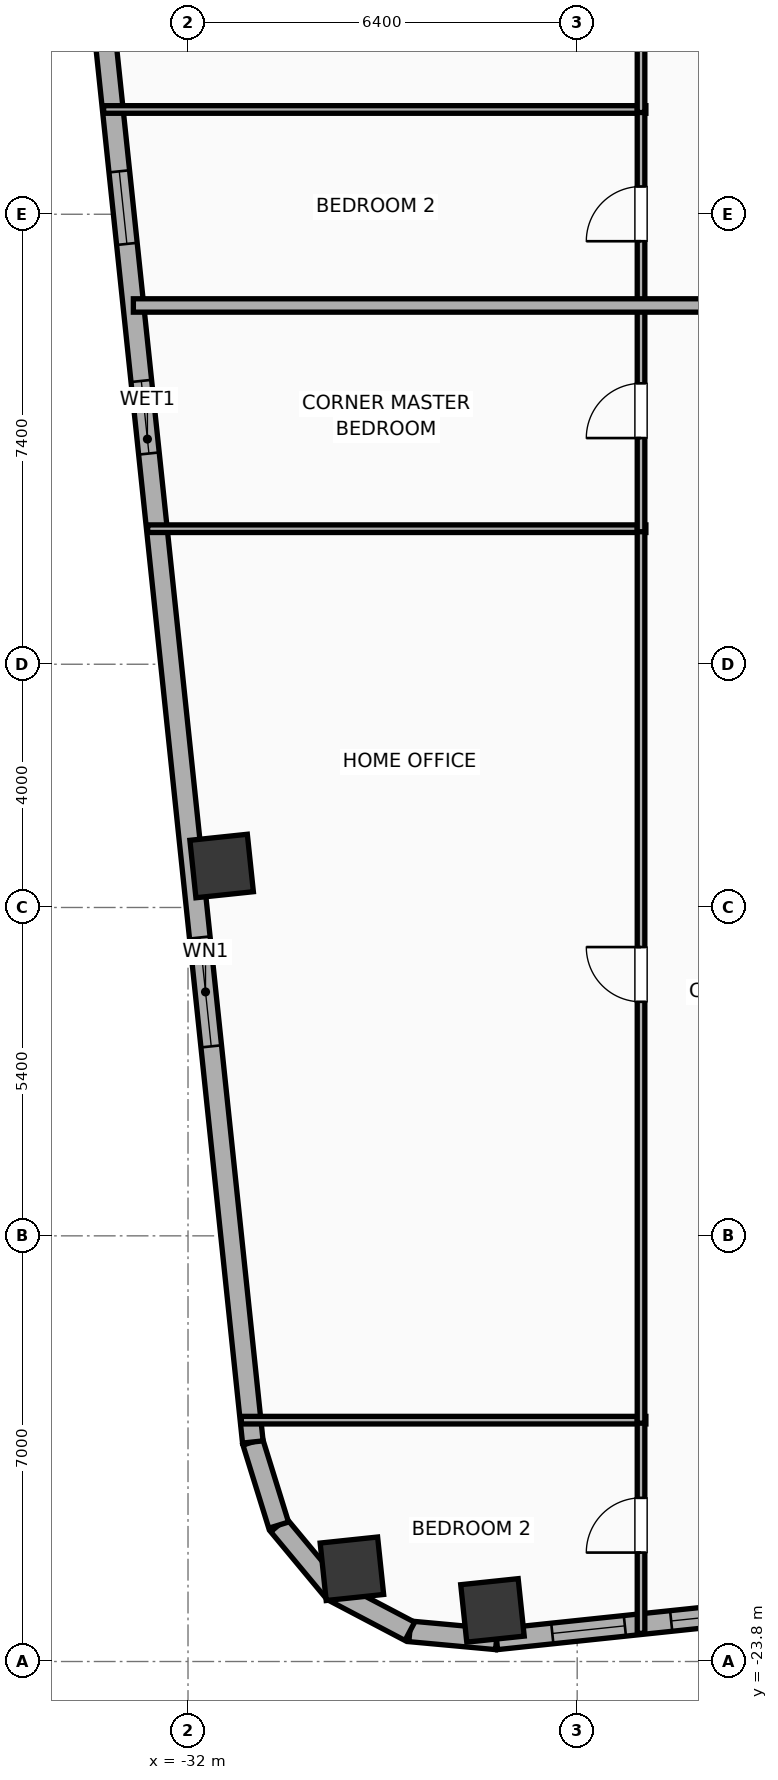
"""IFC4 building model, lengths in metres.
Left out: names, types, materials, properties, quantities, classifications, styles, units other than length and angle.
Written with IfcOpenShell. Run it as: python <this file> out.ifc"""

import sys

from ifc_helpers import new_model, si_unit, direction, frame, frame_2d, origin, origin_2d, place, context, subcontext, project, spatial, rectangle, hollow_rectangle, hollow_circle, extrude, element, fill, save


model = new_model("IFC4")
c1 = context("Model", 3, precision=1e-05, world=origin(), true_north=direction((0.0, 1.0)))
c2 = subcontext(c1, "Body", "Model", "MODEL_VIEW")
j1 = project(units=[si_unit("LENGTHUNIT", "METRE"), si_unit("PLANEANGLEUNIT", "RADIAN")], contexts=[c1])
p1 = place(None, origin())
s1 = spatial("IfcSite", under=j1, at=p1, CompositionType="ELEMENT")
p2 = place(p1, origin())
s2 = spatial("IfcBuilding", under=s1, at=p2, CompositionType="ELEMENT")
p3 = place(p2, frame((0.0, 0.0, 156.0)))
s3 = spatial("IfcBuildingStorey", under=s2, at=p3, CompositionType="ELEMENT", Elevation=156.0)
for number, where, z_axis, x_axis in (
    (1, (-26.993, -22.959, 0.0), (0.0, 0.0, 1.0), (0.995, 0.105, 0.0)),
    (2, (-31.447, -10.718, 0.0), (0.0, 0.0, 1.0), (0.995, 0.105, 0.0)),
):
    element("IfcColumn", number, at=place(p3, frame(where, z_axis=z_axis, x_axis=x_axis)), inside=s3, PredefinedType="COLUMN", context=c2, shape_type="SweptSolid", body=[
        extrude(hollow_rectangle(XDim=0.95, YDim=0.95, WallThickness=0.032, at=origin_2d()), origin(), (0.0, 0.0, 1.0), 3.9),
    ])
p4 = place(p3, frame((-29.305, -22.275, 0.0), z_axis=(0.0, 0.0, 1.0), x_axis=(0.994521895368, 0.104528463268, 0.0)))
e3 = element("IfcColumn", 3, at=p4, inside=s3, PredefinedType="COLUMN", context=c2, shape_type="SweptSolid", body=[
    extrude(hollow_circle(Radius=0.475, WallThickness=0.032, at=origin_2d()), origin(), (0.0, 0.0, 1.0), 3.9),
])
p5 = place(p3, frame((24.756, -18.003, 0.0), z_axis=(0.0, 0.0, 1.0), x_axis=(-0.99452160744, -0.104531202687, 0.0)))
e4 = element("IfcWall", 4, at=p5, inside=s3, PredefinedType="ELEMENTEDWALL", context=c2, shape_type="SweptSolid", body=[
    extrude(rectangle(XDim=51.967, YDim=0.34, at=frame_2d((25.983, 0.0))), origin(), (0.0, 0.0, 1.0), 3.65),
])
p6 = place(p5, frame((25.633, 0.0, 0.75)))
e5 = element("IfcOpeningElement", 5, at=p6, cuts=e4, PredefinedType="OPENING", context=c2, shape_type="SweptSolid", body=[
    extrude(rectangle(XDim=2.4, YDim=2.1, at=frame_2d((1.2, 1.05))), frame((0.0, 0.18, 0.0), z_axis=(0.0, -1.0, 0.0), x_axis=(1.0, 0.0, 0.0)), (0.0, 0.0, 1.0), 0.36),
])
p7 = place(p5, frame((42.369, 0.0, 0.75)))
e6 = element("IfcOpeningElement", 6, at=p7, cuts=e4, PredefinedType="OPENING", context=c2, shape_type="SweptSolid", body=[
    extrude(rectangle(XDim=1.2, YDim=2.05, at=frame_2d((0.6, 1.025))), frame((0.0, 0.18, 0.0), z_axis=(0.0, -1.0, 0.0), x_axis=(1.0, 0.0, 0.0)), (0.0, 0.0, 1.0), 0.36),
])
p8 = place(p5, frame((34.085, 0.0, 0.75)))
e7 = element("IfcOpeningElement", 7, at=p8, cuts=e4, PredefinedType="OPENING", context=c2, shape_type="SweptSolid", body=[
    extrude(rectangle(XDim=1.2, YDim=2.05, at=frame_2d((0.6, 1.025))), frame((0.0, 0.18, 0.0), z_axis=(0.0, -1.0, 0.0), x_axis=(1.0, 0.0, 0.0)), (0.0, 0.0, 1.0), 0.36),
])
p9 = place(p5, frame((36.993, 0.0, 0.75)))
e8 = element("IfcOpeningElement", 8, at=p9, cuts=e4, PredefinedType="OPENING", context=c2, shape_type="SweptSolid", body=[
    extrude(rectangle(XDim=1.2, YDim=2.05, at=frame_2d((0.6, 1.025))), frame((0.0, 0.18, 0.0), z_axis=(0.0, -1.0, 0.0), x_axis=(1.0, 0.0, 0.0)), (0.0, 0.0, 1.0), 0.36),
])
p10 = place(p5, frame((14.397, 0.0, 0.75)))
e9 = element("IfcOpeningElement", 9, at=p10, cuts=e4, PredefinedType="OPENING", context=c2, shape_type="SweptSolid", body=[
    extrude(rectangle(XDim=1.2, YDim=2.05, at=frame_2d((0.6, 1.025))), frame((0.0, 0.18, 0.0), z_axis=(0.0, -1.0, 0.0), x_axis=(1.0, 0.0, 0.0)), (0.0, 0.0, 1.0), 0.36),
])
p11 = place(p5, frame((11.489, 0.0, 0.75)))
e10 = element("IfcOpeningElement", 10, at=p11, cuts=e4, PredefinedType="OPENING", context=c2, shape_type="SweptSolid", body=[
    extrude(rectangle(XDim=1.2, YDim=2.05, at=frame_2d((0.6, 1.025))), frame((0.0, 0.18, 0.0), z_axis=(0.0, -1.0, 0.0), x_axis=(1.0, 0.0, 0.0)), (0.0, 0.0, 1.0), 0.36),
])
p12 = place(p5, frame((8.521, 0.0, 0.75)))
e11 = element("IfcOpeningElement", 11, at=p12, cuts=e4, PredefinedType="OPENING", context=c2, shape_type="SweptSolid", body=[
    extrude(rectangle(XDim=1.2, YDim=2.05, at=frame_2d((0.6, 1.025))), frame((0.0, 0.18, 0.0), z_axis=(0.0, -1.0, 0.0), x_axis=(1.0, 0.0, 0.0)), (0.0, 0.0, 1.0), 0.36),
])
p13 = place(p5, frame((5.582, 0.0, 0.75)))
e12 = element("IfcOpeningElement", 12, at=p13, cuts=e4, PredefinedType="OPENING", context=c2, shape_type="SweptSolid", body=[
    extrude(rectangle(XDim=1.2, YDim=2.05, at=frame_2d((0.6, 1.025))), frame((0.0, 0.18, 0.0), z_axis=(0.0, -1.0, 0.0), x_axis=(1.0, 0.0, 0.0)), (0.0, 0.0, 1.0), 0.36),
])
p14 = place(p5, frame((29.313, 0.0, 0.75)))
e13 = element("IfcOpeningElement", 13, at=p14, cuts=e4, PredefinedType="OPENING", context=c2, shape_type="SweptSolid", body=[
    extrude(rectangle(XDim=1.2, YDim=2.05, at=frame_2d((0.6, 1.025))), frame((0.0, 0.18, 0.0), z_axis=(0.0, -1.0, 0.0), x_axis=(1.0, 0.0, 0.0)), (0.0, 0.0, 1.0), 0.36),
])
p15 = place(p5, frame((22.248, 0.0, 0.75)))
e14 = element("IfcOpeningElement", 14, at=p15, cuts=e4, PredefinedType="OPENING", context=c2, shape_type="SweptSolid", body=[
    extrude(rectangle(XDim=1.2, YDim=2.05, at=frame_2d((0.6, 1.025))), frame((0.0, 0.18, 0.0), z_axis=(0.0, -1.0, 0.0), x_axis=(1.0, 0.0, 0.0)), (0.0, 0.0, 1.0), 0.36),
])
p16 = place(p5, frame((18.186, 0.0, 0.75)))
e15 = element("IfcOpeningElement", 15, at=p16, cuts=e4, PredefinedType="OPENING", context=c2, shape_type="SweptSolid", body=[
    extrude(rectangle(XDim=1.2, YDim=2.05, at=frame_2d((0.6, 1.025))), frame((0.0, 0.18, 0.0), z_axis=(0.0, -1.0, 0.0), x_axis=(1.0, 0.0, 0.0)), (0.0, 0.0, 1.0), 0.36),
])
p17 = place(p5, frame((47.879, 0.0, 0.75)))
e16 = element("IfcOpeningElement", 16, at=p17, cuts=e4, PredefinedType="OPENING", context=c2, shape_type="SweptSolid", body=[
    extrude(rectangle(XDim=1.2, YDim=2.05, at=frame_2d((0.6, 1.025))), frame((0.0, 0.18, 0.0), z_axis=(0.0, -1.0, 0.0), x_axis=(1.0, 0.0, 0.0)), (0.0, 0.0, 1.0), 0.36),
])
p18 = place(p5, frame((49.844, 0.0, 0.75)))
e17 = element("IfcOpeningElement", 17, at=p18, cuts=e4, PredefinedType="OPENING", context=c2, shape_type="SweptSolid", body=[
    extrude(rectangle(XDim=1.2, YDim=2.05, at=frame_2d((0.6, 1.025))), frame((0.0, 0.18, 0.0), z_axis=(0.0, -1.0, 0.0), x_axis=(1.0, 0.0, 0.0)), (0.0, 0.0, 1.0), 0.36),
])
p19 = place(p3, frame((-26.926, -23.435, 0.0), z_axis=(0.0, 0.0, 1.0), x_axis=(-0.995800460351, 0.091550222087, 0.0)))
e18 = element("IfcWall", 18, at=p19, inside=s3, PredefinedType="ELEMENTEDWALL", context=c2, shape_type="SweptSolid", body=[
    extrude(rectangle(XDim=1.432, YDim=0.34, at=frame_2d((0.716, 0.0))), origin(), (0.0, 0.0, 1.0), 3.65),
])
p20 = place(p3, frame((-28.352, -23.304, 0.0), z_axis=(0.0, 0.0, 1.0), x_axis=(-0.884989312682, 0.465611336243, 0.0)))
e19 = element("IfcWall", 19, at=p20, inside=s3, PredefinedType="ELEMENTEDWALL", context=c2, shape_type="SweptSolid", body=[
    extrude(rectangle(XDim=1.415, YDim=0.34, at=frame_2d((0.708, 0.0))), origin(), (0.0, 0.0, 1.0), 3.65),
])
p21 = place(p3, frame((-29.605, -22.645, 0.0), z_axis=(0.0, 0.0, 1.0), x_axis=(-0.639437361921, 0.768843196093, 0.0)))
e20 = element("IfcWall", 20, at=p21, inside=s3, PredefinedType="ELEMENTEDWALL", context=c2, shape_type="SweptSolid", body=[
    extrude(rectangle(XDim=1.415, YDim=0.34, at=frame_2d((0.708, 0.0))), origin(), (0.0, 0.0, 1.0), 3.65),
])
p22 = place(p3, frame((-30.51, -21.557, 0.0), z_axis=(0.0, 0.0, 1.0), x_axis=(-0.296624409546, 0.9549942197, 0.0)))
e21 = element("IfcWall", 21, at=p22, inside=s3, PredefinedType="ELEMENTEDWALL", context=c2, shape_type="SweptSolid", body=[
    extrude(rectangle(XDim=1.432, YDim=0.34, at=frame_2d((0.716, 0.0))), origin(), (0.0, 0.0, 1.0), 3.65),
])
p23 = place(p3, frame((-30.934, -20.19, 0.0), z_axis=(0.0, 0.0, 1.0), x_axis=(-0.10452691388, 0.994522058214, 0.0)))
e22 = element("IfcWall", 22, at=p23, inside=s3, PredefinedType="ELEMENTEDWALL", context=c2, shape_type="SweptSolid", body=[
    extrude(rectangle(XDim=33.167, YDim=0.34, at=frame_2d((16.583, 0.0))), origin(), (0.0, 0.0, 1.0), 3.65),
])
p24 = place(p23, frame((6.542, 0.0, 0.75)))
e23 = element("IfcOpeningElement", 23, at=p24, cuts=e22, PredefinedType="OPENING", context=c2, shape_type="SweptSolid", body=[
    extrude(rectangle(XDim=1.8, YDim=2.1, at=frame_2d((0.9, 1.05))), frame((0.0, 0.18, 0.0), z_axis=(0.0, -1.0, 0.0), x_axis=(1.0, 0.0, 0.0)), (0.0, 0.0, 1.0), 0.36),
])
p25 = place(p23, frame((24.825, 0.0, 0.75)))
e24 = element("IfcOpeningElement", 24, at=p25, cuts=e22, PredefinedType="OPENING", context=c2, shape_type="SweptSolid", body=[
    extrude(rectangle(XDim=1.8, YDim=2.1, at=frame_2d((0.9, 1.05))), frame((0.0, 0.18, 0.0), z_axis=(0.0, -1.0, 0.0), x_axis=(1.0, 0.0, 0.0)), (0.0, 0.0, 1.0), 0.36),
])
p26 = place(p23, frame((16.344, 0.0, 0.75)))
e25 = element("IfcOpeningElement", 25, at=p26, cuts=e22, PredefinedType="OPENING", context=c2, shape_type="SweptSolid", body=[
    extrude(rectangle(XDim=1.2, YDim=2.05, at=frame_2d((0.6, 1.025))), frame((0.0, 0.18, 0.0), z_axis=(0.0, -1.0, 0.0), x_axis=(1.0, 0.0, 0.0)), (0.0, 0.0, 1.0), 0.36),
])
p27 = place(p23, frame((19.811, 0.0, 0.75)))
e26 = element("IfcOpeningElement", 26, at=p27, cuts=e22, PredefinedType="OPENING", context=c2, shape_type="SweptSolid", body=[
    extrude(rectangle(XDim=1.2, YDim=2.05, at=frame_2d((0.6, 1.025))), frame((0.0, 0.18, 0.0), z_axis=(0.0, -1.0, 0.0), x_axis=(1.0, 0.0, 0.0)), (0.0, 0.0, 1.0), 0.36),
])
p28 = place(p3, frame((-31.123, -19.831, 0.0), z_axis=(0.0, 0.0, 1.0), x_axis=(1.0, 0.0, 0.0)))
e27 = element("IfcWall", 27, at=p28, inside=s3, PredefinedType="PARTITIONING", context=c2, shape_type="SweptSolid", body=[
    extrude(rectangle(XDim=6.653, YDim=0.125, at=frame_2d((3.326, 0.0))), origin(), (0.0, 0.0, 1.0), 3.65),
])
p29 = place(p3, frame((-32.664, -5.171, 0.0), z_axis=(0.0, 0.0, 1.0), x_axis=(1.0, 0.0, 0.0)))
e28 = element("IfcWall", 28, at=p29, inside=s3, PredefinedType="PARTITIONING", context=c2, shape_type="SweptSolid", body=[
    extrude(rectangle(XDim=8.194, YDim=0.125, at=frame_2d((4.097, 0.0))), origin(), (0.0, 0.0, 1.0), 3.65),
])
p30 = place(p3, frame((-24.55, -23.336, 0.0), z_axis=(0.0, 0.0, 1.0), x_axis=(0.0, 1.0, 0.0)))
e29 = element("IfcWall", 29, at=p30, inside=s3, PredefinedType="PARTITIONING", context=c2, shape_type="SweptSolid", body=[
    extrude(rectangle(XDim=3.555, YDim=0.125, at=frame_2d((1.778, 0.0))), origin(), (0.0, 0.0, 1.0), 3.65),
])
p31 = place(p30, frame((1.328, 0.0, 0.0)))
e30 = element("IfcOpeningElement", 30, at=p31, cuts=e29, PredefinedType="OPENING", context=c2, shape_type="SweptSolid", body=[
    extrude(rectangle(XDim=0.9, YDim=2.05, at=frame_2d((0.45, 1.025))), frame((0.0, 0.073, 0.0), z_axis=(0.0, -1.0, 0.0), x_axis=(1.0, 0.0, 0.0)), (0.0, 0.0, 1.0), 0.145),
])
p32 = place(p3, frame((-24.55, -19.881, 0.0), z_axis=(0.0, 0.0, 1.0), x_axis=(0.0, 1.0, 0.0)))
e31 = element("IfcWall", 31, at=p32, inside=s3, PredefinedType="PARTITIONING", context=c2, shape_type="SweptSolid", body=[
    extrude(rectangle(XDim=14.76, YDim=0.125, at=frame_2d((7.38, 0.0))), origin(), (0.0, 0.0, 1.0), 3.65),
])
p33 = place(p32, frame((6.93, 0.0, 0.0)))
e32 = element("IfcOpeningElement", 32, at=p33, cuts=e31, PredefinedType="OPENING", context=c2, shape_type="SweptSolid", body=[
    extrude(rectangle(XDim=0.9, YDim=2.05, at=frame_2d((0.45, 1.025))), frame((0.0, 0.073, 0.0), z_axis=(0.0, -1.0, 0.0), x_axis=(1.0, 0.0, 0.0)), (0.0, 0.0, 1.0), 0.145),
])
p34 = place(p3, frame((-24.55, -5.221, 0.0), z_axis=(0.0, 0.0, 1.0), x_axis=(0.0, 1.0, 0.0)))
e33 = element("IfcWall", 33, at=p34, inside=s3, PredefinedType="PARTITIONING", context=c2, shape_type="SweptSolid", body=[
    extrude(rectangle(XDim=3.783, YDim=0.125, at=frame_2d((1.892, 0.0))), origin(), (0.0, 0.0, 1.0), 3.65),
])
p35 = place(p34, frame((1.541, 0.0, 0.0)))
e34 = element("IfcOpeningElement", 34, at=p35, cuts=e33, PredefinedType="OPENING", context=c2, shape_type="SweptSolid", body=[
    extrude(rectangle(XDim=0.9, YDim=2.05, at=frame_2d((0.45, 1.025))), frame((0.0, 0.073, 0.0), z_axis=(0.0, -1.0, 0.0), x_axis=(1.0, 0.0, 0.0)), (0.0, 0.0, 1.0), 0.145),
])
p36 = place(p3, frame((-33.388, 1.723, 0.0), z_axis=(0.0, 0.0, 1.0), x_axis=(1.0, 0.0, 0.0)))
e35 = element("IfcWall", 35, at=p36, inside=s3, PredefinedType="PARTITIONING", context=c2, shape_type="SweptSolid", body=[
    extrude(rectangle(XDim=8.918, YDim=0.125, at=frame_2d((4.459, 0.0))), origin(), (0.0, 0.0, 1.0), 3.65),
])
p37 = place(p3, frame((-24.55, -1.562, 0.0), z_axis=(0.0, 0.0, 1.0), x_axis=(0.0, 1.0, 0.0)))
e36 = element("IfcWall", 36, at=p37, inside=s3, PredefinedType="PARTITIONING", context=c2, shape_type="SweptSolid", body=[
    extrude(rectangle(XDim=3.335, YDim=0.125, at=frame_2d((1.668, 0.0))), origin(), (0.0, 0.0, 1.0), 3.65),
])
p38 = place(p37, frame((1.119, 0.0, 0.0)))
e37 = element("IfcOpeningElement", 37, at=p38, cuts=e36, PredefinedType="OPENING", context=c2, shape_type="SweptSolid", body=[
    extrude(rectangle(XDim=0.9, YDim=2.05, at=frame_2d((0.45, 1.025))), frame((0.0, 0.073, 0.0), z_axis=(0.0, -1.0, 0.0), x_axis=(1.0, 0.0, 0.0)), (0.0, 0.0, 1.0), 0.145),
])
p39 = place(p3, frame((-24.55, 1.673, 0.0), z_axis=(0.0, 0.0, 1.0), x_axis=(0.0, 1.0, 0.0)))
e38 = element("IfcWall", 38, at=p39, inside=s3, PredefinedType="PARTITIONING", context=c2, shape_type="SweptSolid", body=[
    extrude(rectangle(XDim=12.942, YDim=0.125, at=frame_2d((6.471, 0.0))), origin(), (0.0, 0.0, 1.0), 3.65),
])
p40 = place(p39, frame((6.021, 0.0, 0.0)))
e39 = element("IfcOpeningElement", 39, at=p40, cuts=e38, PredefinedType="OPENING", context=c2, shape_type="SweptSolid", body=[
    extrude(rectangle(XDim=0.9, YDim=2.05, at=frame_2d((0.45, 1.025))), frame((0.0, 0.073, 0.0), z_axis=(0.0, -1.0, 0.0), x_axis=(1.0, 0.0, 0.0)), (0.0, 0.0, 1.0), 0.145),
])
p41 = place(p3, frame((-19.72, -1.5, 0.0), z_axis=(0.0, 0.0, 1.0), x_axis=(-1.0, 0.0, 0.0)))
e40 = element("IfcWall", 40, at=p41, inside=s3, PredefinedType="PARTITIONING", context=c2, shape_type="SweptSolid", body=[
    extrude(rectangle(XDim=13.179, YDim=0.22, at=frame_2d((6.589, 0.0))), origin(), (0.0, 0.0, 1.0), 3.65),
])
p42 = place(p24, origin())
e41 = element("IfcWindow", 41, at=p42, inside=s3, PartitioningType="SINGLE_PANEL", PredefinedType="WINDOW", context=c2, shape_type="SweptSolid", body=[
    extrude(rectangle(XDim=1.8, YDim=2.1, at=frame_2d((0.9, 1.05))), frame((0.0, 0.03, 0.0), z_axis=(0.0, -1.0, 0.0), x_axis=(1.0, 0.0, 0.0)), (0.0, 0.0, 1.0), 0.06),
])
fill(e23, e41)
p43 = place(p17, origin())
e42 = element("IfcWindow", 42, at=p43, inside=s3, PartitioningType="SINGLE_PANEL", PredefinedType="WINDOW", context=c2, shape_type="SweptSolid", body=[
    extrude(rectangle(XDim=1.2, YDim=2.05, at=frame_2d((0.6, 1.025))), frame((0.0, 0.03, 0.0), z_axis=(0.0, -1.0, 0.0), x_axis=(1.0, 0.0, 0.0)), (0.0, 0.0, 1.0), 0.06),
])
fill(e16, e42)
p44 = place(p26, origin())
e43 = element("IfcWindow", 43, at=p44, inside=s3, PartitioningType="SINGLE_PANEL", PredefinedType="WINDOW", context=c2, shape_type="SweptSolid", body=[
    extrude(rectangle(XDim=1.2, YDim=2.05, at=frame_2d((0.6, 1.025))), frame((0.0, 0.03, 0.0), z_axis=(0.0, -1.0, 0.0), x_axis=(1.0, 0.0, 0.0)), (0.0, 0.0, 1.0), 0.06),
])
fill(e25, e43)
p45 = place(p18, origin())
e44 = element("IfcWindow", 44, at=p45, inside=s3, PartitioningType="SINGLE_PANEL", PredefinedType="WINDOW", context=c2, shape_type="SweptSolid", body=[
    extrude(rectangle(XDim=1.2, YDim=2.05, at=frame_2d((0.6, 1.025))), frame((0.0, 0.03, 0.0), z_axis=(0.0, -1.0, 0.0), x_axis=(1.0, 0.0, 0.0)), (0.0, 0.0, 1.0), 0.06),
])
fill(e17, e44)
p46 = place(p27, origin())
e45 = element("IfcWindow", 45, at=p46, inside=s3, PartitioningType="SINGLE_PANEL", PredefinedType="WINDOW", context=c2, shape_type="SweptSolid", body=[
    extrude(rectangle(XDim=1.2, YDim=2.05, at=frame_2d((0.6, 1.025))), frame((0.0, 0.03, 0.0), z_axis=(0.0, -1.0, 0.0), x_axis=(1.0, 0.0, 0.0)), (0.0, 0.0, 1.0), 0.06),
])
fill(e26, e45)
p47 = place(p31, origin())
e46 = element("IfcDoor", 46, at=p47, inside=s3, OperationType="SINGLE_SWING_LEFT", PredefinedType="DOOR", context=c2, shape_type="SweptSolid", body=[
    extrude(rectangle(XDim=0.9, YDim=2.05, at=frame_2d((0.45, 1.025))), frame((0.0, 0.025, 0.0), z_axis=(0.0, -1.0, 0.0), x_axis=(1.0, 0.0, 0.0)), (0.0, 0.0, 1.0), 0.05),
])
fill(e30, e46)
p48 = place(p33, origin())
e47 = element("IfcDoor", 47, at=p48, inside=s3, OperationType="SINGLE_SWING_RIGHT", PredefinedType="DOOR", context=c2, shape_type="SweptSolid", body=[
    extrude(rectangle(XDim=0.9, YDim=2.05, at=frame_2d((0.45, 1.025))), frame((0.0, 0.025, 0.0), z_axis=(0.0, -1.0, 0.0), x_axis=(1.0, 0.0, 0.0)), (0.0, 0.0, 1.0), 0.05),
])
fill(e32, e47)
p49 = place(p35, origin())
e48 = element("IfcDoor", 48, at=p49, inside=s3, OperationType="SINGLE_SWING_LEFT", PredefinedType="DOOR", context=c2, shape_type="SweptSolid", body=[
    extrude(rectangle(XDim=0.9, YDim=2.05, at=frame_2d((0.45, 1.025))), frame((0.0, 0.025, 0.0), z_axis=(0.0, -1.0, 0.0), x_axis=(1.0, 0.0, 0.0)), (0.0, 0.0, 1.0), 0.05),
])
fill(e34, e48)
p50 = place(p38, origin())
e49 = element("IfcDoor", 49, at=p50, inside=s3, OperationType="SINGLE_SWING_LEFT", PredefinedType="DOOR", context=c2, shape_type="SweptSolid", body=[
    extrude(rectangle(XDim=0.9, YDim=2.05, at=frame_2d((0.45, 1.025))), frame((0.0, 0.025, 0.0), z_axis=(0.0, -1.0, 0.0), x_axis=(1.0, 0.0, 0.0)), (0.0, 0.0, 1.0), 0.05),
])
fill(e37, e49)
save(model, sys.argv[1])
